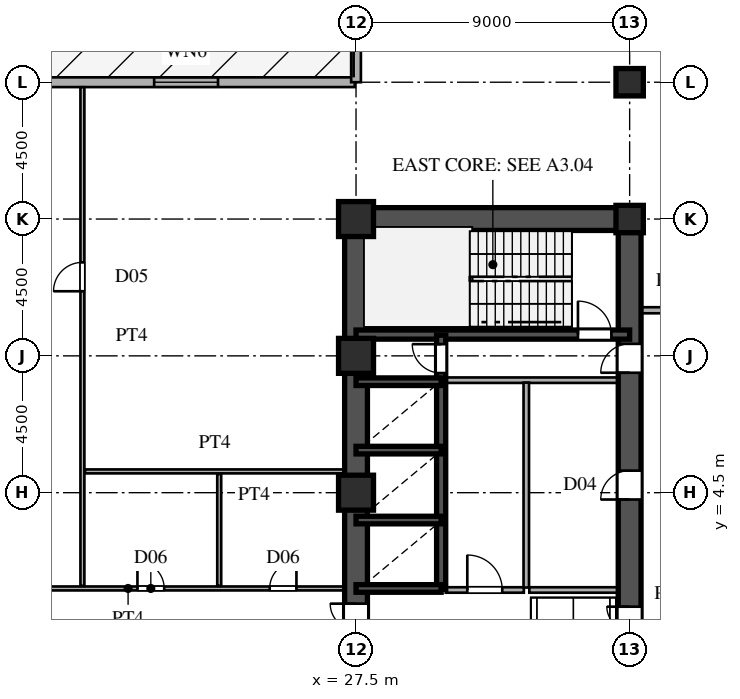
"""IFC4 building model, lengths in metres.
Left out: names, types, materials, properties, quantities, classifications, styles, units other than length and angle.
Written with IfcOpenShell. Run it as: python <this file> out.ifc"""

import sys

from ifc_helpers import new_model, si_unit, direction, frame, frame_2d, origin, origin_2d, place, context, subcontext, project, spatial, rectangle, hollow_rectangle, i_section, extrude, source, transform, mapped, element, fill, save


model = new_model("IFC4")
c1 = context("Model", 3, precision=1e-05, world=origin(), true_north=direction((0.0, 1.0)))
c2 = subcontext(c1, "Body", "Model", "MODEL_VIEW")
j1 = project(units=[si_unit("LENGTHUNIT", "METRE"), si_unit("PLANEANGLEUNIT", "RADIAN")], contexts=[c1])
p1 = place(None, origin())
s1 = spatial("IfcSite", under=j1, at=p1, CompositionType="ELEMENT")
p2 = place(p1, origin())
s2 = spatial("IfcBuilding", under=s1, at=p2, CompositionType="ELEMENT")
p3 = place(p2, frame((0.0, 0.0, 9.9)))
s3 = spatial("IfcBuildingStorey", under=s2, at=p3, CompositionType="ELEMENT", Elevation=9.9)
m1 = source(origin(), c2, "Body", "SweptSolid", [
    extrude(hollow_rectangle(XDim=1.15, YDim=1.15, WallThickness=0.048, at=origin_2d()), origin(), (0.0, 0.0, 1.0), 4.5),
])
for number, where, z_axis, x_axis in (
    (1, (27.5, 4.5, 0.0), (0.0, 0.0, 1.0), (1.0, 0.0, 0.0)),
    (2, (27.5, 9.0, 0.0), (0.0, 0.0, 1.0), (1.0, 0.0, 0.0)),
    (3, (27.5, 13.5, 0.0), (0.0, 0.0, 1.0), (1.0, 0.0, 0.0)),
):
    element("IfcColumn", number, at=place(p3, frame(where, z_axis=z_axis, x_axis=x_axis)), inside=s3, PredefinedType="COLUMN", context=c2, shape_type="MappedRepresentation", body=[
        mapped(m1, transform((0.0, 0.0, 0.0), scale=1.0)),
    ])
m2 = source(origin(), c2, "Body", "SweptSolid", [
    extrude(i_section(OverallWidth=0.9, OverallDepth=0.9, WebThickness=0.036, FlangeThickness=0.055, at=origin_2d()), origin(), (0.0, 0.0, 1.0), 4.5),
])
for number, where, z_axis, x_axis in (
    (4, (36.5, 13.5, 0.0), (0.0, 0.0, 1.0), (1.0, 0.0, 0.0)),
    (5, (36.5, 18.0, 0.0), (0.0, 0.0, 1.0), (1.0, 0.0, 0.0)),
):
    element("IfcColumn", number, at=place(p3, frame(where, z_axis=z_axis, x_axis=x_axis)), inside=s3, PredefinedType="COLUMN", context=c2, shape_type="MappedRepresentation", body=[
        mapped(m2, transform((0.0, 0.0, 0.0), scale=1.0)),
    ])
p4 = place(p3, frame((73.461, 17.01, 0.0), z_axis=(0.0, 0.0, 1.0), x_axis=(-0.968803566014, 0.247829882134, 0.0)))
e6 = element("IfcWall", 6, at=p4, inside=s3, PredefinedType="SOLIDWALL", context=c2, shape_type="SweptSolid", body=[
    extrude(rectangle(XDim=44.304, YDim=0.32, at=frame_2d((22.152, 0.0))), origin(), (0.0, 0.0, 1.0), 4.22),
])
p5 = place(p4, frame((6.0, 0.0, 0.85)))
e7 = element("IfcOpeningElement", 7, at=p5, cuts=e6, PredefinedType="OPENING", context=c2, shape_type="SweptSolid", body=[
    extrude(rectangle(XDim=2.0, YDim=1.95, at=frame_2d((1.0, 0.975))), frame((0.0, 0.17, 0.0), z_axis=(0.0, -1.0, 0.0), x_axis=(1.0, 0.0, 0.0)), (0.0, 0.0, 1.0), 0.34),
])
p6 = place(p4, frame((35.305, 0.0, 0.85)))
e8 = element("IfcOpeningElement", 8, at=p6, cuts=e6, PredefinedType="OPENING", context=c2, shape_type="SweptSolid", body=[
    extrude(rectangle(XDim=2.0, YDim=1.95, at=frame_2d((1.0, 0.975))), frame((0.0, 0.17, 0.0), z_axis=(0.0, -1.0, 0.0), x_axis=(1.0, 0.0, 0.0)), (0.0, 0.0, 1.0), 0.34),
])
p7 = place(p3, frame((27.5, 18.0, 0.0), z_axis=(0.0, 0.0, 1.0), x_axis=(0.0, 1.0, 0.0)))
e9 = element("IfcWall", 9, at=p7, inside=s3, PredefinedType="SOLIDWALL", context=c2, shape_type="SweptSolid", body=[
    extrude(rectangle(XDim=5.476, YDim=0.32, at=frame_2d((2.738, 0.0))), origin(), (0.0, 0.0, 1.0), 3.632),
])
p8 = place(p3, frame((27.46, 18.0, 0.0), z_axis=(0.0, 0.0, 1.0), x_axis=(-1.0, 0.0, 0.0)))
e10 = element("IfcWall", 10, at=p8, inside=s3, PredefinedType="SOLIDWALL", context=c2, shape_type="SweptSolid", body=[
    extrude(rectangle(XDim=54.92, YDim=0.32, at=frame_2d((27.46, 0.0))), origin(), (0.0, 0.0, 1.0), 3.42),
])
p9 = place(p8, frame((34.4, 0.0, 0.0)))
e11 = element("IfcOpeningElement", 11, at=p9, cuts=e10, PredefinedType="OPENING", context=c2, shape_type="SweptSolid", body=[
    extrude(rectangle(XDim=1.8, YDim=2.3, at=frame_2d((0.9, 1.15))), frame((0.0, 0.17, 0.0), z_axis=(0.0, -1.0, 0.0), x_axis=(1.0, 0.0, 0.0)), (0.0, 0.0, 1.0), 0.34),
])
p10 = place(p8, frame((37.4, 0.0, 0.0)))
e12 = element("IfcOpeningElement", 12, at=p10, cuts=e10, PredefinedType="OPENING", context=c2, shape_type="SweptSolid", body=[
    extrude(rectangle(XDim=1.8, YDim=2.3, at=frame_2d((0.9, 1.15))), frame((0.0, 0.17, 0.0), z_axis=(0.0, -1.0, 0.0), x_axis=(1.0, 0.0, 0.0)), (0.0, 0.0, 1.0), 0.34),
])
p11 = place(p8, frame((4.5, 0.0, 0.8)))
e13 = element("IfcOpeningElement", 13, at=p11, cuts=e10, PredefinedType="OPENING", context=c2, shape_type="SweptSolid", body=[
    extrude(rectangle(XDim=2.1, YDim=2.0, at=frame_2d((1.05, 1.0))), frame((0.0, 0.17, 0.0), z_axis=(0.0, -1.0, 0.0), x_axis=(1.0, 0.0, 0.0)), (0.0, 0.0, 1.0), 0.34),
])
p12 = place(p8, frame((25.0, 0.0, 0.8)))
e14 = element("IfcOpeningElement", 14, at=p12, cuts=e10, PredefinedType="OPENING", context=c2, shape_type="SweptSolid", body=[
    extrude(rectangle(XDim=2.1, YDim=2.0, at=frame_2d((1.05, 1.0))), frame((0.0, 0.17, 0.0), z_axis=(0.0, -1.0, 0.0), x_axis=(1.0, 0.0, 0.0)), (0.0, 0.0, 1.0), 0.34),
])
p13 = place(p8, frame((46.42, 0.0, 0.8)))
e15 = element("IfcOpeningElement", 15, at=p13, cuts=e10, PredefinedType="OPENING", context=c2, shape_type="SweptSolid", body=[
    extrude(rectangle(XDim=2.1, YDim=2.0, at=frame_2d((1.05, 1.0))), frame((0.0, 0.17, 0.0), z_axis=(0.0, -1.0, 0.0), x_axis=(1.0, 0.0, 0.0)), (0.0, 0.0, 1.0), 0.34),
])
p14 = place(p3, frame((27.5, 1.3, 0.0), z_axis=(0.0, 0.0, 1.0), x_axis=(0.0, 1.0, 0.0)))
e16 = element("IfcWall", 16, at=p14, inside=s3, PredefinedType="SHEAR", context=c2, shape_type="SweptSolid", body=[
    extrude(rectangle(XDim=12.2, YDim=0.75, at=frame_2d((6.1, 0.0))), origin(), (0.0, 0.0, 1.0), 4.22),
])
p15 = place(p3, frame((27.5, -1.3, 0.0), z_axis=(0.0, 0.0, 1.0), x_axis=(0.0, 1.0, 0.0)))
e17 = element("IfcWall", 17, at=p15, inside=s3, PredefinedType="SHEAR", context=c2, shape_type="SweptSolid", body=[
    extrude(rectangle(XDim=2.6, YDim=0.75, at=frame_2d((1.3, 0.0))), origin(), (0.0, 0.0, 1.0), 4.22),
])
p16 = place(p15, frame((0.45, 0.0, 0.0)))
e18 = element("IfcOpeningElement", 18, at=p16, cuts=e17, PredefinedType="OPENING", context=c2, shape_type="SweptSolid", body=[
    extrude(rectangle(XDim=1.7, YDim=2.35, at=frame_2d((0.85, 1.175))), frame((0.0, 0.385, 0.0), z_axis=(0.0, -1.0, 0.0), x_axis=(1.0, 0.0, 0.0)), (0.0, 0.0, 1.0), 0.77),
])
p17 = place(p3, frame((27.5, 13.5, 0.0), z_axis=(0.0, 0.0, 1.0), x_axis=(1.0, 0.0, 0.0)))
e19 = element("IfcWall", 19, at=p17, inside=s3, PredefinedType="SHEAR", context=c2, shape_type="SweptSolid", body=[
    extrude(rectangle(XDim=9.0, YDim=0.75, at=frame_2d((4.5, 0.0))), origin(), (0.0, 0.0, 1.0), 4.22),
])
p18 = place(p3, frame((36.5, -1.3, 0.0), z_axis=(0.0, 0.0, 1.0), x_axis=(0.0, 1.0, 0.0)))
e20 = element("IfcWall", 20, at=p18, inside=s3, PredefinedType="SHEAR", context=c2, shape_type="SweptSolid", body=[
    extrude(rectangle(XDim=2.6, YDim=0.75, at=frame_2d((1.3, 0.0))), origin(), (0.0, 0.0, 1.0), 4.22),
])
p19 = place(p18, frame((0.55, 0.0, 0.0)))
e21 = element("IfcOpeningElement", 21, at=p19, cuts=e20, PredefinedType="OPENING", context=c2, shape_type="SweptSolid", body=[
    extrude(rectangle(XDim=1.5, YDim=2.3, at=frame_2d((0.75, 1.15))), frame((0.0, 0.385, 0.0), z_axis=(0.0, -1.0, 0.0), x_axis=(1.0, 0.0, 0.0)), (0.0, 0.0, 1.0), 0.77),
])
p20 = place(p3, frame((36.5, 8.2, 0.0), z_axis=(0.0, 0.0, 1.0), x_axis=(0.0, 1.0, 0.0)))
e22 = element("IfcWall", 22, at=p20, inside=s3, PredefinedType="SHEAR", context=c2, shape_type="SweptSolid", body=[
    extrude(rectangle(XDim=5.45, YDim=0.75, at=frame_2d((2.725, 0.0))), origin(), (0.0, 0.0, 1.0), 4.22),
])
p21 = place(p20, frame((0.245, 0.0, 0.0)))
e23 = element("IfcOpeningElement", 23, at=p21, cuts=e22, PredefinedType="OPENING", context=c2, shape_type="SweptSolid", body=[
    extrude(rectangle(XDim=0.95, YDim=2.15, at=frame_2d((0.475, 1.075))), frame((0.0, 0.385, 0.0), z_axis=(0.0, -1.0, 0.0), x_axis=(1.0, 0.0, 0.0)), (0.0, 0.0, 1.0), 0.77),
])
p22 = place(p3, frame((36.5, 1.3, 0.0), z_axis=(0.0, 0.0, 1.0), x_axis=(0.0, 1.0, 0.0)))
e24 = element("IfcWall", 24, at=p22, inside=s3, PredefinedType="SHEAR", context=c2, shape_type="SweptSolid", body=[
    extrude(rectangle(XDim=6.9, YDim=0.75, at=frame_2d((3.45, 0.0))), origin(), (0.0, 0.0, 1.0), 4.22),
])
p23 = place(p22, frame((2.975, 0.0, 0.0)))
e25 = element("IfcOpeningElement", 25, at=p23, cuts=e24, PredefinedType="OPENING", context=c2, shape_type="SweptSolid", body=[
    extrude(rectangle(XDim=0.95, YDim=2.15, at=frame_2d((0.475, 1.075))), frame((0.0, 0.385, 0.0), z_axis=(0.0, -1.0, 0.0), x_axis=(1.0, 0.0, 0.0)), (0.0, 0.0, 1.0), 0.77),
])
p24 = place(p3, frame((27.5, 9.7, 0.0), z_axis=(0.0, 0.0, 1.0), x_axis=(1.0, 0.0, 0.0)))
e26 = element("IfcWall", 26, at=p24, inside=s3, PredefinedType="SHEAR", context=c2, shape_type="SweptSolid", body=[
    extrude(rectangle(XDim=9.0, YDim=0.3, at=frame_2d((4.5, 0.0))), origin(), (0.0, 0.0, 1.0), 4.22),
])
p25 = place(p24, frame((7.3, 0.0, 0.0)))
e27 = element("IfcOpeningElement", 27, at=p25, cuts=e26, PredefinedType="OPENING", context=c2, shape_type="SweptSolid", body=[
    extrude(rectangle(XDim=1.1, YDim=2.2, at=frame_2d((0.55, 1.1))), frame((0.0, 0.16, 0.0), z_axis=(0.0, -1.0, 0.0), x_axis=(1.0, 0.0, 0.0)), (0.0, 0.0, 1.0), 0.32),
])
for number, where, z_axis, x_axis in (
    (28, (27.5, 1.35, 0.0), (0.0, 0.0, 1.0), (1.0, 0.0, 0.0)),
    (29, (27.5, 3.6, 0.0), (0.0, 0.0, 1.0), (1.0, 0.0, 0.0)),
    (30, (27.5, 5.9, 0.0), (0.0, 0.0, 1.0), (1.0, 0.0, 0.0)),
    (31, (27.5, 8.15, 0.0), (0.0, 0.0, 1.0), (1.0, 0.0, 0.0)),
):
    element("IfcWall", number, at=place(p3, frame(where, z_axis=z_axis, x_axis=x_axis)), inside=s3, PredefinedType="SHEAR", context=c2, shape_type="SweptSolid", body=[
        extrude(rectangle(XDim=2.8, YDim=0.25, at=frame_2d((1.4, 0.0))), origin(), (0.0, 0.0, 1.0), 4.22),
    ])
p26 = place(p3, frame((30.3, 1.32, 0.0), z_axis=(0.0, 0.0, 1.0), x_axis=(0.0, 1.0, 0.0)))
e32 = element("IfcWall", 32, at=p26, inside=s3, PredefinedType="SHEAR", context=c2, shape_type="SweptSolid", body=[
    extrude(rectangle(XDim=2.28, YDim=0.3, at=frame_2d((1.14, 0.0))), origin(), (0.0, 0.0, 1.0), 4.22),
])
p27 = place(p3, frame((30.3, 3.6, 0.0), z_axis=(0.0, 0.0, 1.0), x_axis=(0.0, 1.0, 0.0)))
e33 = element("IfcWall", 33, at=p27, inside=s3, PredefinedType="SHEAR", context=c2, shape_type="SweptSolid", body=[
    extrude(rectangle(XDim=2.3, YDim=0.3, at=frame_2d((1.15, 0.0))), origin(), (0.0, 0.0, 1.0), 4.22),
])
p28 = place(p3, frame((30.3, 5.9, 0.0), z_axis=(0.0, 0.0, 1.0), x_axis=(0.0, 1.0, 0.0)))
e34 = element("IfcWall", 34, at=p28, inside=s3, PredefinedType="SHEAR", context=c2, shape_type="SweptSolid", body=[
    extrude(rectangle(XDim=2.25, YDim=0.3, at=frame_2d((1.125, 0.0))), origin(), (0.0, 0.0, 1.0), 4.22),
])
p29 = place(p3, frame((30.3, 8.15, 0.0), z_axis=(0.0, 0.0, 1.0), x_axis=(0.0, 1.0, 0.0)))
e35 = element("IfcWall", 35, at=p29, inside=s3, PredefinedType="SHEAR", context=c2, shape_type="SweptSolid", body=[
    extrude(rectangle(XDim=1.53, YDim=0.3, at=frame_2d((0.765, 0.0))), origin(), (0.0, 0.0, 1.0), 4.22),
])
p30 = place(p29, frame((0.285, 0.0, 0.0)))
e36 = element("IfcOpeningElement", 36, at=p30, cuts=e35, PredefinedType="OPENING", context=c2, shape_type="SweptSolid", body=[
    extrude(rectangle(XDim=0.95, YDim=2.15, at=frame_2d((0.475, 1.075))), frame((0.0, 0.16, 0.0), z_axis=(0.0, -1.0, 0.0), x_axis=(1.0, 0.0, 0.0)), (0.0, 0.0, 1.0), 0.32),
])
p31 = place(p3, frame((30.45, 8.2, 0.0), z_axis=(0.0, 0.0, 1.0), x_axis=(1.0, 0.0, 0.0)))
e37 = element("IfcWall", 37, at=p31, inside=s3, PredefinedType="PARTITIONING", context=c2, shape_type="SweptSolid", body=[
    extrude(rectangle(XDim=5.7, YDim=0.18, at=frame_2d((2.85, 0.0))), origin(), (0.0, 0.0, 1.0), 4.22),
])
p32 = place(p3, frame((33.1, 1.38, 0.0), z_axis=(0.0, 0.0, 1.0), x_axis=(0.0, 1.0, 0.0)))
e38 = element("IfcWall", 38, at=p32, inside=s3, PredefinedType="PARTITIONING", context=c2, shape_type="SweptSolid", body=[
    extrude(rectangle(XDim=6.74, YDim=0.18, at=frame_2d((3.37, 0.0))), origin(), (0.0, 0.0, 1.0), 4.22),
])
p33 = place(p3, frame((30.45, 1.3, 0.0), z_axis=(0.0, 0.0, 1.0), x_axis=(1.0, 0.0, 0.0)))
e39 = element("IfcWall", 39, at=p33, inside=s3, PredefinedType="PARTITIONING", context=c2, shape_type="SweptSolid", body=[
    extrude(rectangle(XDim=2.57, YDim=0.18, at=frame_2d((1.285, 0.0))), origin(), (0.0, 0.0, 1.0), 4.22),
])
p34 = place(p33, frame((0.71, 0.0, 0.0)))
e40 = element("IfcOpeningElement", 40, at=p34, cuts=e39, PredefinedType="OPENING", context=c2, shape_type="SweptSolid", body=[
    extrude(rectangle(XDim=1.15, YDim=2.2, at=frame_2d((0.575, 1.1))), frame((0.0, 0.1, 0.0), z_axis=(0.0, -1.0, 0.0), x_axis=(1.0, 0.0, 0.0)), (0.0, 0.0, 1.0), 0.2),
])
p35 = place(p3, frame((33.2, 1.3, 0.0), z_axis=(0.0, 0.0, 1.0), x_axis=(1.0, 0.0, 0.0)))
e41 = element("IfcWall", 41, at=p35, inside=s3, PredefinedType="PARTITIONING", context=c2, shape_type="SweptSolid", body=[
    extrude(rectangle(XDim=2.95, YDim=0.18, at=frame_2d((1.475, 0.0))), origin(), (0.0, 0.0, 1.0), 4.22),
])
p36 = place(p3, frame((12.885, 1.35, 0.0), z_axis=(0.0, 0.0, 1.0), x_axis=(1.0, 0.0, 0.0)))
e42 = element("IfcWall", 42, at=p36, inside=s3, PredefinedType="PARTITIONING", context=c2, shape_type="SweptSolid", body=[
    extrude(rectangle(XDim=14.235, YDim=0.13, at=frame_2d((7.118, 0.0))), origin(), (0.0, 0.0, 1.0), 4.22),
])
p37 = place(p36, frame((7.425, 0.0, 0.0)))
e43 = element("IfcOpeningElement", 43, at=p37, cuts=e42, PredefinedType="OPENING", context=c2, shape_type="SweptSolid", body=[
    extrude(rectangle(XDim=0.88, YDim=2.1, at=frame_2d((0.44, 1.05))), frame((0.0, 0.075, 0.0), z_axis=(0.0, -1.0, 0.0), x_axis=(1.0, 0.0, 0.0)), (0.0, 0.0, 1.0), 0.15),
])
p38 = place(p36, frame((11.775, 0.0, 0.0)))
e44 = element("IfcOpeningElement", 44, at=p38, cuts=e42, PredefinedType="OPENING", context=c2, shape_type="SweptSolid", body=[
    extrude(rectangle(XDim=0.88, YDim=2.1, at=frame_2d((0.44, 1.05))), frame((0.0, 0.075, 0.0), z_axis=(0.0, -1.0, 0.0), x_axis=(1.0, 0.0, 0.0)), (0.0, 0.0, 1.0), 0.15),
])
p39 = place(p3, frame((18.585, 5.2, 0.0), z_axis=(0.0, 0.0, 1.0), x_axis=(1.0, 0.0, 0.0)))
e45 = element("IfcWall", 45, at=p39, inside=s3, PredefinedType="PARTITIONING", context=c2, shape_type="SweptSolid", body=[
    extrude(rectangle(XDim=8.535, YDim=0.13, at=frame_2d((4.268, 0.0))), origin(), (0.0, 0.0, 1.0), 4.22),
])
p40 = place(p3, frame((36.88, 10.5, 0.0), z_axis=(0.0, 0.0, 1.0), x_axis=(1.0, 0.0, 0.0)))
e46 = element("IfcWall", 46, at=p40, inside=s3, PredefinedType="PARTITIONING", context=c2, shape_type="SweptSolid", body=[
    extrude(rectangle(XDim=2.035, YDim=0.2, at=frame_2d((1.018, 0.0))), origin(), (0.0, 0.0, 1.0), 4.22),
])
p41 = place(p3, frame((18.5, 1.435, 0.0), z_axis=(0.0, 0.0, 1.0), x_axis=(0.0, 1.0, 0.0)))
e47 = element("IfcWall", 47, at=p41, inside=s3, PredefinedType="PARTITIONING", context=c2, shape_type="SweptSolid", body=[
    extrude(rectangle(XDim=16.4, YDim=0.13, at=frame_2d((8.2, 0.0))), origin(), (0.0, 0.0, 1.0), 4.22),
])
p42 = place(p41, frame((9.69, 0.0, 0.0)))
e48 = element("IfcOpeningElement", 48, at=p42, cuts=e47, PredefinedType="OPENING", context=c2, shape_type="SweptSolid", body=[
    extrude(rectangle(XDim=0.95, YDim=2.15, at=frame_2d((0.475, 1.075))), frame((0.0, 0.075, 0.0), z_axis=(0.0, -1.0, 0.0), x_axis=(1.0, 0.0, 0.0)), (0.0, 0.0, 1.0), 0.15),
])
p43 = place(p3, frame((23.0, 1.435, 0.0), z_axis=(0.0, 0.0, 1.0), x_axis=(0.0, 1.0, 0.0)))
e49 = element("IfcWall", 49, at=p43, inside=s3, PredefinedType="PARTITIONING", context=c2, shape_type="SweptSolid", body=[
    extrude(rectangle(XDim=3.68, YDim=0.13, at=frame_2d((1.84, 0.0))), origin(), (0.0, 0.0, 1.0), 4.22),
])
m3 = source(origin(), c2, "Body", "SweptSolid", [
    extrude(rectangle(XDim=2.1, YDim=2.0, at=frame_2d((1.05, 1.0))), frame((0.0, 0.03, 0.0), z_axis=(0.0, -1.0, 0.0), x_axis=(1.0, 0.0, 0.0)), (0.0, 0.0, 1.0), 0.06),
])
p44 = place(p11, origin())
e50 = element("IfcWindow", 50, at=p44, inside=s3, PartitioningType="SINGLE_PANEL", PredefinedType="WINDOW", context=c2, shape_type="MappedRepresentation", body=[
    mapped(m3, transform((0.0, 0.0, 0.0), scale=1.0)),
])
fill(e13, e50)
m4 = source(origin(), c2, "Body", "SweptSolid", [
    extrude(rectangle(XDim=1.7, YDim=2.35, at=frame_2d((0.85, 1.175))), frame((0.0, 0.025, 0.0), z_axis=(0.0, -1.0, 0.0), x_axis=(1.0, 0.0, 0.0)), (0.0, 0.0, 1.0), 0.05),
])
p45 = place(p16, origin())
e51 = element("IfcDoor", 51, at=p45, inside=s3, OperationType="DOUBLE_SWING_LEFT", PredefinedType="DOOR", context=c2, shape_type="MappedRepresentation", body=[
    mapped(m4, transform((0.0, 0.0, 0.0), scale=1.0)),
])
fill(e18, e51)
m5 = source(origin(), c2, "Body", "SweptSolid", [
    extrude(rectangle(XDim=1.5, YDim=2.3, at=frame_2d((0.75, 1.15))), frame((0.0, 0.025, 0.0), z_axis=(0.0, -1.0, 0.0), x_axis=(1.0, 0.0, 0.0)), (0.0, 0.0, 1.0), 0.05),
])
p46 = place(p19, origin())
e52 = element("IfcDoor", 52, at=p46, inside=s3, OperationType="DOUBLE_SWING_LEFT", PredefinedType="DOOR", context=c2, shape_type="MappedRepresentation", body=[
    mapped(m5, transform((0.0, 0.0, 0.0), scale=1.0)),
])
fill(e21, e52)
m6 = source(origin(), c2, "Body", "SweptSolid", [
    extrude(rectangle(XDim=0.95, YDim=2.15, at=frame_2d((0.475, 1.075))), frame((0.0, 0.025, 0.0), z_axis=(0.0, -1.0, 0.0), x_axis=(1.0, 0.0, 0.0)), (0.0, 0.0, 1.0), 0.05),
])
p47 = place(p21, origin())
e53 = element("IfcDoor", 53, at=p47, inside=s3, OperationType="SINGLE_SWING_LEFT", PredefinedType="DOOR", context=c2, shape_type="MappedRepresentation", body=[
    mapped(m6, transform((0.0, 0.0, 0.0), scale=1.0)),
])
fill(e23, e53)
p48 = place(p23, origin())
e54 = element("IfcDoor", 54, at=p48, inside=s3, OperationType="SINGLE_SWING_LEFT", PredefinedType="DOOR", context=c2, shape_type="MappedRepresentation", body=[
    mapped(m6, transform((0.0, 0.0, 0.0), scale=1.0)),
])
fill(e25, e54)
m7 = source(origin(), c2, "Body", "SweptSolid", [
    extrude(rectangle(XDim=1.1, YDim=2.2, at=frame_2d((0.55, 1.1))), frame((0.0, 0.025, 0.0), z_axis=(0.0, -1.0, 0.0), x_axis=(1.0, 0.0, 0.0)), (0.0, 0.0, 1.0), 0.05),
])
p49 = place(p25, origin())
e55 = element("IfcDoor", 55, at=p49, inside=s3, OperationType="SINGLE_SWING_LEFT", PredefinedType="DOOR", context=c2, shape_type="MappedRepresentation", body=[
    mapped(m7, transform((0.0, 0.0, 0.0), scale=1.0)),
])
fill(e27, e55)
p50 = place(p30, origin())
e56 = element("IfcDoor", 56, at=p50, inside=s3, OperationType="SINGLE_SWING_RIGHT", PredefinedType="DOOR", context=c2, shape_type="MappedRepresentation", body=[
    mapped(m6, transform((0.0, 0.0, 0.0), scale=1.0)),
])
fill(e36, e56)
m8 = source(origin(), c2, "Body", "SweptSolid", [
    extrude(rectangle(XDim=1.15, YDim=2.2, at=frame_2d((0.575, 1.1))), frame((0.0, 0.025, 0.0), z_axis=(0.0, -1.0, 0.0), x_axis=(1.0, 0.0, 0.0)), (0.0, 0.0, 1.0), 0.05),
])
p51 = place(p34, origin())
e57 = element("IfcDoor", 57, at=p51, inside=s3, OperationType="SINGLE_SWING_LEFT", PredefinedType="DOOR", context=c2, shape_type="MappedRepresentation", body=[
    mapped(m8, transform((0.0, 0.0, 0.0), scale=1.0)),
])
fill(e40, e57)
m9 = source(origin(), c2, "Body", "SweptSolid", [
    extrude(rectangle(XDim=0.88, YDim=2.1, at=frame_2d((0.44, 1.05))), frame((0.0, 0.025, 0.0), z_axis=(0.0, -1.0, 0.0), x_axis=(1.0, 0.0, 0.0)), (0.0, 0.0, 1.0), 0.05),
])
p52 = place(p37, origin())
e58 = element("IfcDoor", 58, at=p52, inside=s3, OperationType="SINGLE_SWING_LEFT", PredefinedType="DOOR", context=c2, shape_type="MappedRepresentation", body=[
    mapped(m9, transform((0.0, 0.0, 0.0), scale=1.0)),
])
fill(e43, e58)
p53 = place(p38, origin())
e59 = element("IfcDoor", 59, at=p53, inside=s3, OperationType="SINGLE_SWING_RIGHT", PredefinedType="DOOR", context=c2, shape_type="MappedRepresentation", body=[
    mapped(m9, transform((0.0, 0.0, 0.0), scale=1.0)),
])
fill(e44, e59)
m10 = source(origin(), c2, "Body", "SweptSolid", [
    extrude(rectangle(XDim=0.95, YDim=2.15, at=frame_2d((0.475, 1.075))), frame((0.0, 0.025, 0.0), z_axis=(0.0, -1.0, 0.0), x_axis=(1.0, 0.0, 0.0)), (0.0, 0.0, 1.0), 0.05),
])
p54 = place(p42, origin())
e60 = element("IfcDoor", 60, at=p54, inside=s3, OperationType="SINGLE_SWING_LEFT", PredefinedType="DOOR", context=c2, shape_type="MappedRepresentation", body=[
    mapped(m10, transform((0.0, 0.0, 0.0), scale=1.0)),
])
fill(e48, e60)
save(model, sys.argv[1])
